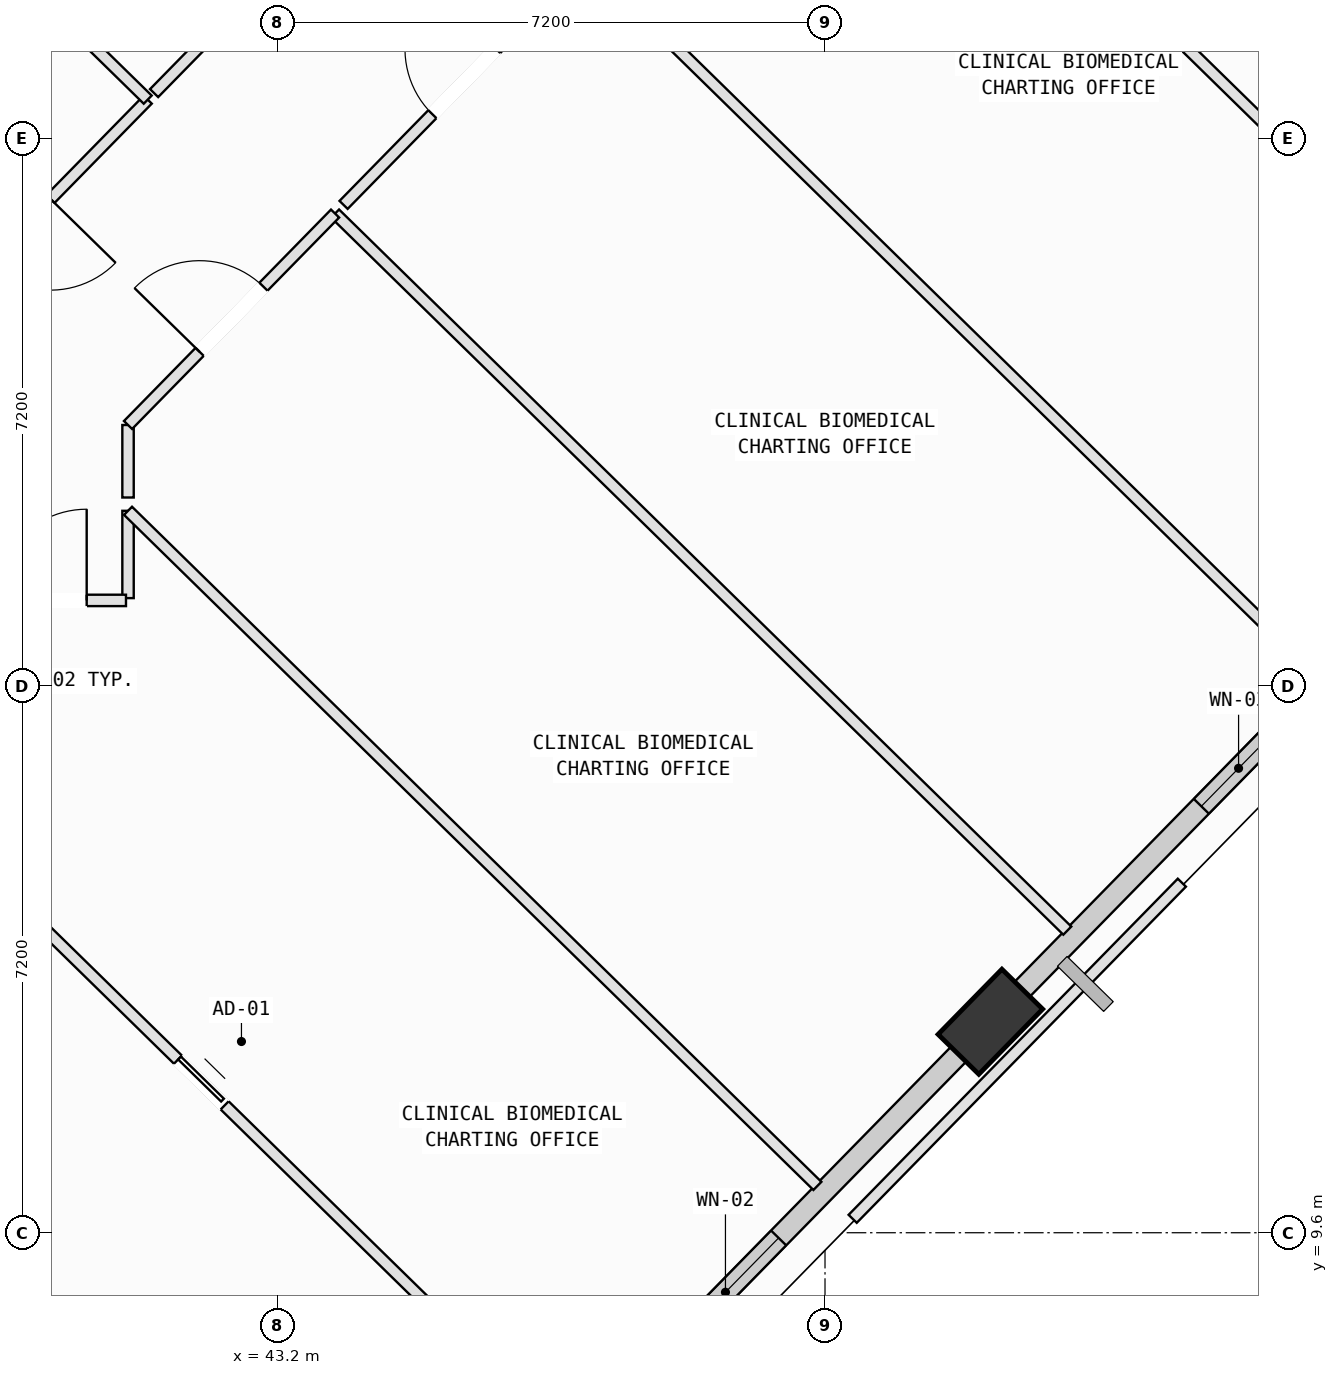
"""IFC4 building model, lengths in metres.
Left out: names, types, materials, properties, quantities, classifications, styles, units other than length and angle.
Written with IfcOpenShell. Run it as: python <this file> out.ifc"""

import sys

from ifc_helpers import new_model, si_unit, direction, frame, frame_2d, origin, origin_2d, place, context, subcontext, project, spatial, rectangle, extrude, element, fill, save


model = new_model("IFC4")
c1 = context("Model", 3, precision=1e-05, world=origin(), true_north=direction((0.0, 1.0)))
c2 = subcontext(c1, "Body", "Model", "MODEL_VIEW")
j1 = project(units=[si_unit("LENGTHUNIT", "METRE"), si_unit("PLANEANGLEUNIT", "RADIAN")], contexts=[c1])
p1 = place(None, origin())
s1 = spatial("IfcSite", under=j1, at=p1, CompositionType="ELEMENT")
p2 = place(p1, origin())
s2 = spatial("IfcBuilding", under=s1, at=p2, CompositionType="ELEMENT")
p3 = place(p2, frame((0.0, 0.0, 219.2)))
s3 = spatial("IfcBuildingStorey", under=s2, at=p3, CompositionType="ELEMENT", Elevation=219.2)
p4 = place(p3, frame((52.576, 12.376, 0.002), z_axis=(0.05060454574, 0.078765488863, 0.995607943778), x_axis=(-0.973141214407, -0.220277069584, 0.066889382094)))
e1 = element("IfcColumn", 1, at=p4, inside=s3, PredefinedType="COLUMN", context=c2, shape_type="SweptSolid", body=[
    extrude(rectangle(XDim=1.2, YDim=0.75, at=origin_2d()), origin(), (0.0, 0.0, 1.0), 4.014),
])
p5 = place(p3, frame((52.427, 12.225, 0.0), z_axis=(0.0, 0.0, 1.0), x_axis=(-0.699656404434, -0.714479471877, 0.0)))
e2 = element("IfcWall", 2, at=p5, inside=s3, PredefinedType="SOLIDWALL", context=c2, shape_type="SweptSolid", body=[
    extrude(rectangle(XDim=6.407, YDim=0.28, at=frame_2d((3.204, 0.0))), origin(), (0.0, 0.0, 1.0), 3.265),
])
p6 = place(p5, frame((3.77, 0.0, 0.75)))
e3 = element("IfcOpeningElement", 3, at=p6, cuts=e2, PredefinedType="OPENING", context=c2, shape_type="SweptSolid", body=[
    extrude(rectangle(XDim=2.0, YDim=1.95, at=frame_2d((1.0, 0.975))), frame((0.0, 0.15, 0.0), z_axis=(0.0, -1.0, 0.0), x_axis=(1.0, 0.0, 0.0)), (0.0, 0.0, 1.0), 0.3),
])
p7 = place(p3, frame((57.472, 17.376, 0.0), z_axis=(0.0, 0.0, 1.0), x_axis=(-0.699669698405, -0.71446645347, 0.0)))
e4 = element("IfcWall", 4, at=p7, inside=s3, PredefinedType="SOLIDWALL", context=c2, shape_type="SweptSolid", body=[
    extrude(rectangle(XDim=6.418, YDim=0.28, at=frame_2d((3.209, 0.0))), origin(), (0.0, 0.0, 1.0), 3.265),
])
p8 = place(p7, frame((1.631, 0.0, 0.75)))
e5 = element("IfcOpeningElement", 5, at=p8, cuts=e4, PredefinedType="OPENING", context=c2, shape_type="SweptSolid", body=[
    extrude(rectangle(XDim=1.4, YDim=1.85, at=frame_2d((0.7, 0.925))), frame((0.0, 0.15, 0.0), z_axis=(0.0, -1.0, 0.0), x_axis=(1.0, 0.0, 0.0)), (0.0, 0.0, 1.0), 0.3),
])
p9 = place(p3, frame((53.322, 28.791, 0.0), z_axis=(0.0, 0.0, 1.0), x_axis=(0.714465321122, -0.699670854698, 0.0)))
e6 = element("IfcWall", 6, at=p9, inside=s3, PredefinedType="SOLIDWALL", context=c2, shape_type="SweptSolid", body=[
    extrude(rectangle(XDim=7.046, YDim=0.28, at=frame_2d((3.523, 0.0))), origin(), (0.0, 0.0, 1.0), 3.265),
])
p10 = place(p3, frame((36.15, 10.917, 0.0), z_axis=(0.0, 0.0, 1.0), x_axis=(0.71447324437, -0.699662763822, 0.0)))
e7 = element("IfcWall", 7, at=p10, inside=s3, PredefinedType="PARTITIONING", context=c2, shape_type="SweptSolid", body=[
    extrude(rectangle(XDim=10.599, YDim=0.15, at=frame_2d((5.3, 0.0))), origin(), (0.0, 0.0, 1.0), 3.78),
])
p11 = place(p10, frame((4.87, 0.0, 0.0)))
e8 = element("IfcOpeningElement", 8, at=p11, cuts=e7, PredefinedType="OPENING", context=c2, shape_type="SweptSolid", body=[
    extrude(rectangle(XDim=0.86, YDim=2.06, at=frame_2d((0.43, 1.03))), frame((0.0, 0.085, 0.0), z_axis=(0.0, -1.0, 0.0), x_axis=(1.0, 0.0, 0.0)), (0.0, 0.0, 1.0), 0.17),
])
p12 = place(p3, frame((37.377, 16.294, 0.0), z_axis=(0.0, 0.0, 1.0), x_axis=(0.714446126833, -0.699690454311, 0.0)))
e9 = element("IfcWall", 9, at=p12, inside=s3, PredefinedType="PARTITIONING", context=c2, shape_type="SweptSolid", body=[
    extrude(rectangle(XDim=13.485, YDim=0.15, at=frame_2d((6.742, 0.0))), origin(), (0.0, 0.0, 1.0), 3.78),
])
p13 = place(p12, frame((6.312, 0.0, 0.0)))
e10 = element("IfcOpeningElement", 10, at=p13, cuts=e9, PredefinedType="OPENING", context=c2, shape_type="SweptSolid", body=[
    extrude(rectangle(XDim=0.86, YDim=2.06, at=frame_2d((0.43, 1.03))), frame((0.0, 0.085, 0.0), z_axis=(0.0, -1.0, 0.0), x_axis=(1.0, 0.0, 0.0)), (0.0, 0.0, 1.0), 0.17),
])
p14 = place(p3, frame((41.23, 17.95, 0.0), z_axis=(0.0, 0.0, 1.0), x_axis=(0.0, 1.0, 0.0)))
e11 = element("IfcWall", 11, at=p14, inside=s3, PredefinedType="PARTITIONING", context=c2, shape_type="SweptSolid", body=[
    extrude(rectangle(XDim=1.149, YDim=0.15, at=frame_2d((0.575, 0.0))), origin(), (0.0, 0.0, 1.0), 3.78),
])
p15 = place(p3, frame((41.23, 19.099, 0.0), z_axis=(0.0, 0.0, 1.0), x_axis=(0.714433717365, -0.699703125255, 0.0)))
e12 = element("IfcWall", 12, at=p15, inside=s3, PredefinedType="PARTITIONING", context=c2, shape_type="SweptSolid", body=[
    extrude(rectangle(XDim=12.696, YDim=0.15, at=frame_2d((6.348, 0.0))), origin(), (0.0, 0.0, 1.0), 3.78),
])
p16 = place(p3, frame((38.969, 17.92, 0.0), z_axis=(0.0, 0.0, 1.0), x_axis=(1.0, 0.0, 0.0)))
e13 = element("IfcWall", 13, at=p16, inside=s3, PredefinedType="PARTITIONING", context=c2, shape_type="SweptSolid", body=[
    extrude(rectangle(XDim=2.234, YDim=0.15, at=frame_2d((1.117, 0.0))), origin(), (0.0, 0.0, 1.0), 3.165),
])
p17 = place(p16, frame((0.517, 0.0, 0.0)))
e14 = element("IfcOpeningElement", 14, at=p17, cuts=e13, PredefinedType="OPENING", context=c2, shape_type="SweptSolid", body=[
    extrude(rectangle(XDim=1.2, YDim=2.15, at=frame_2d((0.6, 1.075))), frame((0.0, 0.085, 0.0), z_axis=(0.0, -1.0, 0.0), x_axis=(1.0, 0.0, 0.0)), (0.0, 0.0, 1.0), 0.17),
])
p18 = place(p3, frame((43.954, 23.01, 0.0), z_axis=(0.0, 0.0, 1.0), x_axis=(0.714437262996, -0.699699504961, 0.0)))
e15 = element("IfcWall", 15, at=p18, inside=s3, PredefinedType="PARTITIONING", context=c2, shape_type="SweptSolid", body=[
    extrude(rectangle(XDim=13.484, YDim=0.15, at=frame_2d((6.742, 0.0))), origin(), (0.0, 0.0, 1.0), 3.415),
])
p19 = place(p3, frame((41.23, 19.274, 0.0), z_axis=(0.0, 0.0, 1.0), x_axis=(0.0, 1.0, 0.0)))
e16 = element("IfcWall", 16, at=p19, inside=s3, PredefinedType="PARTITIONING", context=c2, shape_type="SweptSolid", body=[
    extrude(rectangle(XDim=0.954, YDim=0.15, at=frame_2d((0.477, 0.0))), origin(), (0.0, 0.0, 1.0), 3.78),
])
p20 = place(p3, frame((41.23, 20.228, 0.0), z_axis=(0.0, 0.0, 1.0), x_axis=(0.699637463653, 0.714498019209, 0.0)))
e17 = element("IfcWall", 17, at=p20, inside=s3, PredefinedType="PARTITIONING", context=c2, shape_type="SweptSolid", body=[
    extrude(rectangle(XDim=3.894, YDim=0.15, at=frame_2d((1.947, 0.0))), origin(), (0.0, 0.0, 1.0), 3.78),
])
p21 = place(p20, frame((1.347, 0.0, 0.0)))
e18 = element("IfcOpeningElement", 18, at=p21, cuts=e17, PredefinedType="OPENING", context=c2, shape_type="SweptSolid", body=[
    extrude(rectangle(XDim=1.2, YDim=2.15, at=frame_2d((0.6, 1.075))), frame((0.0, 0.085, 0.0), z_axis=(0.0, -1.0, 0.0), x_axis=(1.0, 0.0, 0.0)), (0.0, 0.0, 1.0), 0.17),
])
p22 = place(p3, frame((44.066, 23.124, 0.0), z_axis=(0.0, 0.0, 1.0), x_axis=(0.699592189313, 0.714542349097, 0.0)))
e19 = element("IfcWall", 19, at=p22, inside=s3, PredefinedType="PARTITIONING", context=c2, shape_type="SweptSolid", body=[
    extrude(rectangle(XDim=4.54, YDim=0.15, at=frame_2d((2.27, 0.0))), origin(), (0.0, 0.0, 1.0), 3.78),
])
p23 = place(p22, frame((1.67, 0.0, 0.0)))
e20 = element("IfcOpeningElement", 20, at=p23, cuts=e19, PredefinedType="OPENING", context=c2, shape_type="SweptSolid", body=[
    extrude(rectangle(XDim=1.2, YDim=2.15, at=frame_2d((0.6, 1.075))), frame((0.0, 0.085, 0.0), z_axis=(0.0, -1.0, 0.0), x_axis=(1.0, 0.0, 0.0)), (0.0, 0.0, 1.0), 0.17),
])
p24 = place(p3, frame((47.242, 26.368, 0.0), z_axis=(0.0, 0.0, 1.0), x_axis=(0.714409925355, -0.699727417323, 0.0)))
e21 = element("IfcWall", 21, at=p24, inside=s3, PredefinedType="PARTITIONING", context=c2, shape_type="SweptSolid", body=[
    extrude(rectangle(XDim=13.485, YDim=0.15, at=frame_2d((6.743, 0.0))), origin(), (0.0, 0.0, 1.0), 3.78),
])
p25 = place(p3, frame((50.531, 29.726, 0.0), z_axis=(0.0, 0.0, 1.0), x_axis=(0.714431068807, -0.699705829563, 0.0)))
e22 = element("IfcWall", 22, at=p25, inside=s3, PredefinedType="PARTITIONING", context=c2, shape_type="SweptSolid", body=[
    extrude(rectangle(XDim=10.926, YDim=0.15, at=frame_2d((5.463, 0.0))), origin(), (0.0, 0.0, 1.0), 3.78),
])
p26 = place(p3, frame((41.489, 24.509, 0.0), z_axis=(0.0, 0.0, 1.0), x_axis=(-0.699655259221, -0.71448059333, 0.0)))
e23 = element("IfcWall", 23, at=p26, inside=s3, PredefinedType="PARTITIONING", context=c2, shape_type="SweptSolid", body=[
    extrude(rectangle(XDim=4.858, YDim=0.15, at=frame_2d((2.429, 0.0))), origin(), (0.0, 0.0, 1.0), 3.165),
])
p27 = place(p26, frame((1.829, 0.0, 0.0)))
e24 = element("IfcOpeningElement", 24, at=p27, cuts=e23, PredefinedType="OPENING", context=c2, shape_type="SweptSolid", body=[
    extrude(rectangle(XDim=1.2, YDim=2.15, at=frame_2d((0.6, 1.075))), frame((0.0, 0.085, 0.0), z_axis=(0.0, -1.0, 0.0), x_axis=(1.0, 0.0, 0.0)), (0.0, 0.0, 1.0), 0.17),
])
p28 = place(p3, frame((38.363, 27.57, 0.0), z_axis=(0.0, 0.0, 1.0), x_axis=(0.71448950504, -0.69964615856, 0.0)))
e25 = element("IfcWall", 25, at=p28, inside=s3, PredefinedType="PARTITIONING", context=c2, shape_type="SweptSolid", body=[
    extrude(rectangle(XDim=4.375, YDim=0.15, at=frame_2d((2.188, 0.0))), origin(), (0.0, 0.0, 1.0), 3.415),
])
p29 = place(p3, frame((45.155, 28.253, 0.0), z_axis=(0.0, 0.0, 1.0), x_axis=(-0.699652687423, -0.714483111754, 0.0)))
e26 = element("IfcWall", 26, at=p29, inside=s3, PredefinedType="PARTITIONING", context=c2, shape_type="SweptSolid", body=[
    extrude(rectangle(XDim=5.12, YDim=0.15, at=frame_2d((2.56, 0.0))), origin(), (0.0, 0.0, 1.0), 3.78),
])
p30 = place(p29, frame((2.1, 0.0, 0.0)))
e27 = element("IfcOpeningElement", 27, at=p30, cuts=e26, PredefinedType="OPENING", context=c2, shape_type="SweptSolid", body=[
    extrude(rectangle(XDim=0.92, YDim=2.1, at=frame_2d((0.46, 1.05))), frame((0.0, 0.085, 0.0), z_axis=(0.0, -1.0, 0.0), x_axis=(1.0, 0.0, 0.0)), (0.0, 0.0, 1.0), 0.17),
])
p31 = place(p3, frame((55.095, 14.206, 0.0), z_axis=(0.0, 0.0, 1.0), x_axis=(-0.699633601264, -0.714501801245, 0.0)))
e28 = element("IfcWall", 28, at=p31, inside=s3, PredefinedType="PARTITIONING", context=c2, shape_type="SweptSolid", body=[
    extrude(rectangle(XDim=6.19, YDim=0.15, at=frame_2d((3.095, 0.0))), origin(), (0.0, 0.0, 1.0), 3.78),
])
p32 = place(p3, frame((51.764, 31.086, 0.0), z_axis=(0.0, 0.0, 1.0), x_axis=(0.714519943853, -0.69961507262, 0.0)))
e29 = element("IfcWall", 29, at=p32, inside=s3, PredefinedType="PARTITIONING", context=c2, shape_type="SweptSolid", body=[
    extrude(rectangle(XDim=11.22, YDim=0.15, at=frame_2d((5.61, 0.0))), origin(), (0.0, 0.0, 1.0), 3.265),
])
p33 = place(p6, origin())
e30 = element("IfcWindow", 30, at=p33, inside=s3, PartitioningType="SINGLE_PANEL", PredefinedType="WINDOW", context=c2, shape_type="SweptSolid", body=[
    extrude(rectangle(XDim=2.0, YDim=1.95, at=frame_2d((1.0, 0.975))), frame((0.0, 0.03, 0.0), z_axis=(0.0, -1.0, 0.0), x_axis=(1.0, 0.0, 0.0)), (0.0, 0.0, 1.0), 0.06),
])
fill(e3, e30)
p34 = place(p8, origin())
e31 = element("IfcWindow", 31, at=p34, inside=s3, PartitioningType="SINGLE_PANEL", PredefinedType="WINDOW", context=c2, shape_type="SweptSolid", body=[
    extrude(rectangle(XDim=1.4, YDim=1.85, at=frame_2d((0.7, 0.925))), frame((0.0, 0.03, 0.0), z_axis=(0.0, -1.0, 0.0), x_axis=(1.0, 0.0, 0.0)), (0.0, 0.0, 1.0), 0.06),
])
fill(e5, e31)
p35 = place(p17, origin())
e32 = element("IfcDoor", 32, at=p35, inside=s3, OperationType="SINGLE_SWING_RIGHT", PredefinedType="DOOR", context=c2, shape_type="SweptSolid", body=[
    extrude(rectangle(XDim=1.2, YDim=2.15, at=frame_2d((0.6, 1.075))), frame((0.0, 0.025, 0.0), z_axis=(0.0, -1.0, 0.0), x_axis=(1.0, 0.0, 0.0)), (0.0, 0.0, 1.0), 0.05),
])
fill(e14, e32)
p36 = place(p21, origin())
e33 = element("IfcDoor", 33, at=p36, inside=s3, OperationType="SINGLE_SWING_LEFT", PredefinedType="DOOR", context=c2, shape_type="SweptSolid", body=[
    extrude(rectangle(XDim=1.2, YDim=2.15, at=frame_2d((0.6, 1.075))), frame((0.0, 0.025, 0.0), z_axis=(0.0, -1.0, 0.0), x_axis=(1.0, 0.0, 0.0)), (0.0, 0.0, 1.0), 0.05),
])
fill(e18, e33)
p37 = place(p23, origin())
e34 = element("IfcDoor", 34, at=p37, inside=s3, OperationType="SINGLE_SWING_RIGHT", PredefinedType="DOOR", context=c2, shape_type="SweptSolid", body=[
    extrude(rectangle(XDim=1.2, YDim=2.15, at=frame_2d((0.6, 1.075))), frame((0.0, 0.025, 0.0), z_axis=(0.0, -1.0, 0.0), x_axis=(1.0, 0.0, 0.0)), (0.0, 0.0, 1.0), 0.05),
])
fill(e20, e34)
p38 = place(p13, origin())
e35 = element("IfcDoor", 35, at=p38, inside=s3, OperationType="SLIDING_TO_LEFT", PredefinedType="DOOR", context=c2, shape_type="SweptSolid", body=[
    extrude(rectangle(XDim=0.86, YDim=2.06, at=frame_2d((0.43, 1.03))), frame((0.0, 0.025, 0.0), z_axis=(0.0, -1.0, 0.0), x_axis=(1.0, 0.0, 0.0)), (0.0, 0.0, 1.0), 0.05),
])
fill(e10, e35)
save(model, sys.argv[1])
